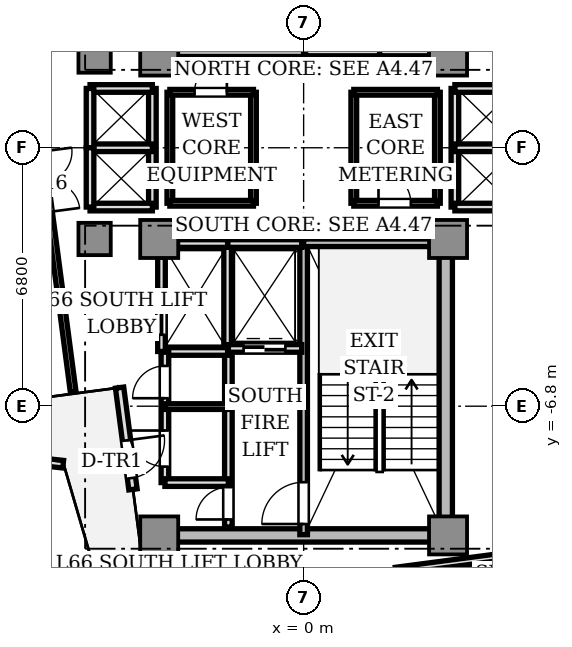
"""IFC4 building model, lengths in metres.
Left out: names, types, materials, properties, quantities, classifications, styles, units other than length and angle.
Written with IfcOpenShell. Run it as: python <this file> out.ifc"""

import sys

from ifc_helpers import new_model, si_unit, direction, frame, frame_2d, origin, origin_2d, place, context, subcontext, project, spatial, rectangle, extrude, source, transform, mapped, element, fill, save


model = new_model("IFC4")
c1 = context("Model", 3, precision=1e-05, world=origin(), true_north=direction((0.0, 1.0)))
c2 = subcontext(c1, "Body", "Model", "MODEL_VIEW")
j1 = project(units=[si_unit("LENGTHUNIT", "METRE"), si_unit("PLANEANGLEUNIT", "RADIAN")], contexts=[c1])
p1 = place(None, origin())
s1 = spatial("IfcSite", under=j1, at=p1, CompositionType="ELEMENT")
p2 = place(p1, origin())
s2 = spatial("IfcBuilding", under=s1, at=p2, CompositionType="ELEMENT")
p3 = place(p2, frame((0.0, 0.0, 237.8)))
s3 = spatial("IfcBuildingStorey", under=s2, at=p3, CompositionType="ELEMENT", Elevation=237.8)
p4 = place(p3, frame((-3.55, -10.2, 0.0), z_axis=(0.0, 0.0, 1.0), x_axis=(1.0, 0.0, 0.0)))
e1 = element("IfcWall", 1, at=p4, inside=s3, PredefinedType="SHEAR", context=c2, shape_type="SweptSolid", body=[
    extrude(rectangle(XDim=7.1, YDim=0.35, at=frame_2d((3.55, 0.0))), origin(), (0.0, 0.0, 1.0), 3.11),
])
p5 = place(p3, frame((3.74, -9.75, 0.0), z_axis=(0.0, 0.0, 1.0), x_axis=(0.0, 1.0, 0.0)))
e2 = element("IfcWall", 2, at=p5, inside=s3, PredefinedType="SHEAR", context=c2, shape_type="SweptSolid", body=[
    extrude(rectangle(XDim=6.9, YDim=0.35, at=frame_2d((3.45, 0.0))), origin(), (0.0, 0.0, 1.0), 3.11),
])
m1 = source(origin(), c2, "Body", "SweptSolid", [
    extrude(rectangle(XDim=1.0, YDim=1.0, at=origin_2d()), origin(), (0.0, 0.0, 1.0), 3.11),
])
for number, where, z_axis, x_axis in (
    (3, (-3.8, 2.4, 0.0), (0.0, 0.0, 1.0), (1.0, 0.0, 0.0)),
    (4, (3.8, 2.4, 0.0), (0.0, 0.0, 1.0), (1.0, 0.0, 0.0)),
    (5, (-3.8, -2.4, 0.0), (0.0, 0.0, 1.0), (1.0, 0.0, 0.0)),
    (6, (3.8, -2.4, 0.0), (0.0, 0.0, 1.0), (1.0, 0.0, 0.0)),
    (7, (-3.8, -10.2, 0.0), (0.0, 0.0, 1.0), (1.0, 0.0, 0.0)),
    (8, (3.8, -10.2, 0.0), (0.0, 0.0, 1.0), (1.0, 0.0, 0.0)),
):
    element("IfcColumn", number, at=place(p3, frame(where, z_axis=z_axis, x_axis=x_axis)), inside=s3, PredefinedType="COLUMN", context=c2, shape_type="MappedRepresentation", body=[
        mapped(m1, transform((0.0, 0.0, 0.0), scale=1.0)),
    ])
m2 = source(origin(), c2, "Body", "SweptSolid", [
    extrude(rectangle(XDim=0.85, YDim=0.85, at=origin_2d()), origin(), (0.0, 0.0, 1.0), 3.11),
])
for number, where, z_axis, x_axis in (
    (9, (-5.5, 2.4, 0.0), (0.0, 0.0, 1.0), (1.0, 0.0, 0.0)),
    (10, (-5.5, -2.4, 0.0), (0.0, 0.0, 1.0), (1.0, 0.0, 0.0)),
):
    element("IfcColumn", number, at=place(p3, frame(where, z_axis=z_axis, x_axis=x_axis)), inside=s3, PredefinedType="COLUMN", context=c2, shape_type="MappedRepresentation", body=[
        mapped(m2, transform((0.0, 0.0, 0.0), scale=1.0)),
    ])
p6 = place(p3, frame((-4.843, -6.311, 0.0), z_axis=(0.0, 0.0, 1.0), x_axis=(0.130564442062, -0.991439824936, 0.0)))
e11 = element("IfcWall", 11, at=p6, inside=s3, PredefinedType="STANDARD", context=c2, shape_type="SweptSolid", body=[
    extrude(rectangle(XDim=2.7, YDim=0.22, at=frame_2d((1.35, 0.0))), origin(), (0.0, 0.0, 1.0), 3.11),
])
p7 = place(p6, frame((1.4, 0.0, 0.0)))
e12 = element("IfcOpeningElement", 12, at=p7, cuts=e11, PredefinedType="OPENING", context=c2, shape_type="SweptSolid", body=[
    extrude(rectangle(XDim=1.0, YDim=2.2, at=frame_2d((0.5, 1.1))), frame((0.0, 0.12, 0.0), z_axis=(0.0, -1.0, 0.0), x_axis=(1.0, 0.0, 0.0)), (0.0, 0.0, 1.0), 0.24),
])
p8 = place(p3, frame((-8.0, -8.145, 0.0), z_axis=(0.0, 0.0, 1.0), x_axis=(0.994167153372, -0.107850225574, 0.0)))
e13 = element("IfcWall", 13, at=p8, inside=s3, PredefinedType="PARAPET", context=c2, shape_type="SweptSolid", body=[
    extrude(rectangle(XDim=1.682, YDim=0.2, at=frame_2d((0.841, 0.0))), origin(), (0.0, 0.0, 1.0), 0.65),
])
p9 = place(p3, frame((0.0, 2.5, 0.0), z_axis=(0.0, 0.0, 1.0), x_axis=(0.0, 1.0, 0.0)))
e14 = element("IfcWall", 14, at=p9, inside=s3, PredefinedType="SOLIDWALL", context=c2, shape_type="SweptSolid", body=[
    extrude(rectangle(XDim=7.68, YDim=0.2, at=frame_2d((3.84, 0.0))), origin(), (0.0, 0.0, 1.0), 3.11),
])
p10 = place(p9, frame((6.36, 0.0, 0.0)))
e15 = element("IfcOpeningElement", 15, at=p10, cuts=e14, PredefinedType="OPENING", context=c2, shape_type="SweptSolid", body=[
    extrude(rectangle(XDim=1.1, YDim=2.15, at=frame_2d((0.55, 1.075))), frame((0.0, 0.11, 0.0), z_axis=(0.0, -1.0, 0.0), x_axis=(1.0, 0.0, 0.0)), (0.0, 0.0, 1.0), 0.22),
])
p11 = place(p3, frame((-3.72, 2.5, 0.0), z_axis=(0.0, 0.0, 1.0), x_axis=(1.0, 0.0, 0.0)))
e16 = element("IfcWall", 16, at=p11, inside=s3, PredefinedType="SOLIDWALL", context=c2, shape_type="SweptSolid", body=[
    extrude(rectangle(XDim=3.72, YDim=0.2, at=frame_2d((1.86, 0.0))), origin(), (0.0, 0.0, 1.0), 3.11),
])
p12 = place(p3, frame((0.0, -10.18, 0.0), z_axis=(0.0, 0.0, 1.0), x_axis=(0.0, 1.0, 0.0)))
e17 = element("IfcWall", 17, at=p12, inside=s3, PredefinedType="SOLIDWALL", context=c2, shape_type="SweptSolid", body=[
    extrude(rectangle(XDim=7.68, YDim=0.2, at=frame_2d((3.84, 0.0))), origin(), (0.0, 0.0, 1.0), 3.11),
])
p13 = place(p12, frame((0.28, 0.0, 0.0)))
e18 = element("IfcOpeningElement", 18, at=p13, cuts=e17, PredefinedType="OPENING", context=c2, shape_type="SweptSolid", body=[
    extrude(rectangle(XDim=1.1, YDim=2.15, at=frame_2d((0.55, 1.075))), frame((0.0, 0.11, 0.0), z_axis=(0.0, -1.0, 0.0), x_axis=(1.0, 0.0, 0.0)), (0.0, 0.0, 1.0), 0.22),
])
p14 = place(p3, frame((0.0, -2.5, 0.0), z_axis=(0.0, 0.0, 1.0), x_axis=(1.0, 0.0, 0.0)))
e19 = element("IfcWall", 19, at=p14, inside=s3, PredefinedType="SOLIDWALL", context=c2, shape_type="SweptSolid", body=[
    extrude(rectangle(XDim=3.72, YDim=0.2, at=frame_2d((1.86, 0.0))), origin(), (0.0, 0.0, 1.0), 3.11),
])
p15 = place(p3, frame((-1.98, -9.98, 0.0), z_axis=(0.0, 0.0, 1.0), x_axis=(0.0, 1.0, 0.0)))
e20 = element("IfcWall", 20, at=p15, inside=s3, PredefinedType="SOLIDWALL", context=c2, shape_type="SweptSolid", body=[
    extrude(rectangle(XDim=4.66, YDim=0.2, at=frame_2d((2.33, 0.0))), origin(), (0.0, 0.0, 1.0), 2.66),
])
p16 = place(p15, frame((0.2, 0.0, 0.0)))
e21 = element("IfcOpeningElement", 21, at=p16, cuts=e20, PredefinedType="OPENING", context=c2, shape_type="SweptSolid", body=[
    extrude(rectangle(XDim=0.85, YDim=2.1, at=frame_2d((0.425, 1.05))), frame((0.0, 0.11, 0.0), z_axis=(0.0, -1.0, 0.0), x_axis=(1.0, 0.0, 0.0)), (0.0, 0.0, 1.0), 0.22),
])
p17 = place(p3, frame((2.0, 2.5, 0.0), z_axis=(0.0, 0.0, 1.0), x_axis=(0.0, 1.0, 0.0)))
e22 = element("IfcWall", 22, at=p17, inside=s3, PredefinedType="SOLIDWALL", context=c2, shape_type="SweptSolid", body=[
    extrude(rectangle(XDim=2.78, YDim=0.2, at=frame_2d((1.39, 0.0))), origin(), (0.0, 0.0, 1.0), 2.66),
])
p18 = place(p3, frame((0.05, 2.52, 0.0), z_axis=(0.0, 0.0, 1.0), x_axis=(1.0, 0.0, 0.0)))
e23 = element("IfcWall", 23, at=p18, inside=s3, PredefinedType="SOLIDWALL", context=c2, shape_type="SweptSolid", body=[
    extrude(rectangle(XDim=1.95, YDim=0.2, at=frame_2d((0.975, 0.0))), origin(), (0.0, 0.0, 1.0), 2.66),
])
p19 = place(p3, frame((-2.0, -5.28, 0.0), z_axis=(0.0, 0.0, 1.0), x_axis=(0.0, 1.0, 0.0)))
e24 = element("IfcWall", 24, at=p19, inside=s3, PredefinedType="SOLIDWALL", context=c2, shape_type="SweptSolid", body=[
    extrude(rectangle(XDim=2.78, YDim=0.2, at=frame_2d((1.39, 0.0))), origin(), (0.0, 0.0, 1.0), 2.66),
])
p20 = place(p3, frame((-2.0, -2.52, 0.0), z_axis=(0.0, 0.0, 1.0), x_axis=(1.0, 0.0, 0.0)))
e25 = element("IfcWall", 25, at=p20, inside=s3, PredefinedType="SOLIDWALL", context=c2, shape_type="SweptSolid", body=[
    extrude(rectangle(XDim=1.95, YDim=0.2, at=frame_2d((0.975, 0.0))), origin(), (0.0, 0.0, 1.0), 2.66),
])
p21 = place(p3, frame((-1.98, -5.28, 0.0), z_axis=(0.0, 0.0, 1.0), x_axis=(1.0, 0.0, 0.0)))
e26 = element("IfcWall", 26, at=p21, inside=s3, PredefinedType="SOLIDWALL", context=c2, shape_type="SweptSolid", body=[
    extrude(rectangle(XDim=1.93, YDim=0.2, at=frame_2d((0.965, 0.0))), origin(), (0.0, 0.0, 1.0), 2.66),
])
p22 = place(p21, frame((0.4, 0.0, 0.0)))
e27 = element("IfcOpeningElement", 27, at=p22, cuts=e26, PredefinedType="OPENING", context=c2, shape_type="SweptSolid", body=[
    extrude(rectangle(XDim=1.1, YDim=2.2, at=frame_2d((0.55, 1.1))), frame((0.0, 0.11, 0.0), z_axis=(0.0, -1.0, 0.0), x_axis=(1.0, 0.0, 0.0)), (0.0, 0.0, 1.0), 0.22),
])
for number, where, z_axis, x_axis in (
    (28, (2.0, 2.52, 0.0), (0.0, 0.0, 1.0), (1.0, 0.0, 0.0)),
    (29, (-3.32, -2.52, 0.0), (0.0, 0.0, 1.0), (1.0, 0.0, 0.0)),
):
    element("IfcWall", number, at=place(p3, frame(where, z_axis=z_axis, x_axis=x_axis)), inside=s3, PredefinedType="SOLIDWALL", context=c2, shape_type="SweptSolid", body=[
        extrude(rectangle(XDim=1.32, YDim=0.2, at=frame_2d((0.66, 0.0))), origin(), (0.0, 0.0, 1.0), 2.66),
    ])
p23 = place(p3, frame((-3.74, -5.36, 0.0), z_axis=(0.0, 0.0, 1.0), x_axis=(1.0, 0.0, 0.0)))
e30 = element("IfcWall", 30, at=p23, inside=s3, PredefinedType="SOLIDWALL", context=c2, shape_type="SweptSolid", body=[
    extrude(rectangle(XDim=1.74, YDim=0.2, at=frame_2d((0.87, 0.0))), origin(), (0.0, 0.0, 1.0), 2.66),
])
p24 = place(p3, frame((-3.74, -5.36, 0.0), z_axis=(0.0, 0.0, 1.0), x_axis=(0.0, 1.0, 0.0)))
e31 = element("IfcWall", 31, at=p24, inside=s3, PredefinedType="SOLIDWALL", context=c2, shape_type="SweptSolid", body=[
    extrude(rectangle(XDim=2.48, YDim=0.2, at=frame_2d((1.24, 0.0))), origin(), (0.0, 0.0, 1.0), 2.66),
])
p25 = place(p24, frame((0.44, 0.0, 0.0)))
e32 = element("IfcOpeningElement", 32, at=p25, cuts=e31, PredefinedType="OPENING", context=c2, shape_type="SweptSolid", body=[
    extrude(rectangle(XDim=1.2, YDim=2.2, at=frame_2d((0.6, 1.1))), frame((0.0, 0.11, 0.0), z_axis=(0.0, -1.0, 0.0), x_axis=(1.0, 0.0, 0.0)), (0.0, 0.0, 1.0), 0.22),
])
p26 = place(p3, frame((3.98, -1.56, 0.0), z_axis=(0.0, 0.0, 1.0), x_axis=(0.0, 1.0, 0.0)))
e33 = element("IfcWall", 33, at=p26, inside=s3, PredefinedType="SOLIDWALL", context=c2, shape_type="SweptSolid", body=[
    extrude(rectangle(XDim=3.12, YDim=0.2, at=frame_2d((1.56, 0.0))), origin(), (0.0, 0.0, 1.0), 2.33),
])
for number, where, z_axis, x_axis in (
    (34, (3.98, 1.56, 0.0), (0.0, 0.0, 1.0), (1.0, 0.0, 0.0)),
    (35, (3.98, -1.56, 0.0), (0.0, 0.0, 1.0), (1.0, 0.0, 0.0)),
    (36, (3.98, 0.0, 0.0), (0.0, 0.0, 1.0), (1.0, 0.0, 0.0)),
):
    element("IfcWall", number, at=place(p3, frame(where, z_axis=z_axis, x_axis=x_axis)), inside=s3, PredefinedType="SOLIDWALL", context=c2, shape_type="SweptSolid", body=[
        extrude(rectangle(XDim=1.64, YDim=0.2, at=frame_2d((0.82, 0.0))), origin(), (0.0, 0.0, 1.0), 2.66),
    ])
p27 = place(p3, frame((-3.98, -1.56, 0.0), z_axis=(0.0, 0.0, 1.0), x_axis=(0.0, 1.0, 0.0)))
e37 = element("IfcWall", 37, at=p27, inside=s3, PredefinedType="SOLIDWALL", context=c2, shape_type="SweptSolid", body=[
    extrude(rectangle(XDim=3.12, YDim=0.2, at=frame_2d((1.56, 0.0))), origin(), (0.0, 0.0, 1.0), 2.33),
])
for number, where, z_axis, x_axis in (
    (38, (-5.62, 1.56, 0.0), (0.0, 0.0, 1.0), (1.0, 0.0, 0.0)),
    (39, (-5.62, -1.56, 0.0), (0.0, 0.0, 1.0), (1.0, 0.0, 0.0)),
    (40, (-5.62, 0.0, 0.0), (0.0, 0.0, 1.0), (1.0, 0.0, 0.0)),
):
    element("IfcWall", number, at=place(p3, frame(where, z_axis=z_axis, x_axis=x_axis)), inside=s3, PredefinedType="SOLIDWALL", context=c2, shape_type="SweptSolid", body=[
        extrude(rectangle(XDim=1.64, YDim=0.2, at=frame_2d((0.82, 0.0))), origin(), (0.0, 0.0, 1.0), 2.66),
    ])
for number, where, z_axis, x_axis in (
    (41, (-5.62, 0.0, 0.0), (0.0, 0.0, 1.0), (0.0, 1.0, 0.0)),
    (42, (-5.62, -1.56, 0.0), (0.0, 0.0, 1.0), (0.0, 1.0, 0.0)),
):
    element("IfcWall", number, at=place(p3, frame(where, z_axis=z_axis, x_axis=x_axis)), inside=s3, PredefinedType="SOLIDWALL", context=c2, shape_type="SweptSolid", body=[
        extrude(rectangle(XDim=1.56, YDim=0.2, at=frame_2d((0.78, 0.0))), origin(), (0.0, 0.0, 1.0), 2.66),
    ])
p28 = place(p3, frame((-3.65, -8.81, 0.0), z_axis=(0.0, 0.0, 1.0), x_axis=(0.0, 1.0, 0.0)))
e43 = element("IfcWall", 43, at=p28, inside=s3, PredefinedType="SOLIDWALL", context=c2, shape_type="SweptSolid", body=[
    extrude(rectangle(XDim=3.43, YDim=0.2, at=frame_2d((1.715, 0.0))), origin(), (0.0, 0.0, 1.0), 2.66),
])
p29 = place(p28, frame((0.42, 0.0, 0.0)))
e44 = element("IfcOpeningElement", 44, at=p29, cuts=e43, PredefinedType="OPENING", context=c2, shape_type="SweptSolid", body=[
    extrude(rectangle(XDim=0.95, YDim=2.15, at=frame_2d((0.475, 1.075))), frame((0.0, 0.11, 0.0), z_axis=(0.0, -1.0, 0.0), x_axis=(1.0, 0.0, 0.0)), (0.0, 0.0, 1.0), 0.22),
])
p30 = place(p28, frame((2.22, 0.0, 0.0)))
e45 = element("IfcOpeningElement", 45, at=p30, cuts=e43, PredefinedType="OPENING", context=c2, shape_type="SweptSolid", body=[
    extrude(rectangle(XDim=0.85, YDim=2.1, at=frame_2d((0.425, 1.05))), frame((0.0, 0.11, 0.0), z_axis=(0.0, -1.0, 0.0), x_axis=(1.0, 0.0, 0.0)), (0.0, 0.0, 1.0), 0.22),
])
p31 = place(p3, frame((-3.65, -8.81, 0.0), z_axis=(0.0, 0.0, 1.0), x_axis=(1.0, 0.0, 0.0)))
e46 = element("IfcWall", 46, at=p31, inside=s3, PredefinedType="SOLIDWALL", context=c2, shape_type="SweptSolid", body=[
    extrude(rectangle(XDim=1.67, YDim=0.2, at=frame_2d((0.835, 0.0))), origin(), (0.0, 0.0, 1.0), 2.66),
])
p32 = place(p3, frame((-3.65, -6.81, 0.0), z_axis=(0.0, 0.0, 1.0), x_axis=(1.0, 0.0, 0.0)))
e47 = element("IfcWall", 47, at=p32, inside=s3, PredefinedType="PARTITIONING", context=c2, shape_type="SweptSolid", body=[
    extrude(rectangle(XDim=1.67, YDim=0.15, at=frame_2d((0.835, 0.0))), origin(), (0.0, 0.0, 1.0), 2.66),
])
p33 = place(p3, frame((-1.32, -1.46, 0.0), z_axis=(0.0, 0.0, 1.0), x_axis=(0.0, 1.0, 0.0)))
e48 = element("IfcWall", 48, at=p33, inside=s3, PredefinedType="PARTITIONING", context=c2, shape_type="SweptSolid", body=[
    extrude(rectangle(XDim=2.92, YDim=0.15, at=frame_2d((1.46, 0.0))), origin(), (0.0, 0.0, 1.0), 2.66),
])
p34 = place(p3, frame((-3.52, -1.46, 0.0), z_axis=(0.0, 0.0, 1.0), x_axis=(0.0, 1.0, 0.0)))
e49 = element("IfcWall", 49, at=p34, inside=s3, PredefinedType="PARTITIONING", context=c2, shape_type="SweptSolid", body=[
    extrude(rectangle(XDim=2.92, YDim=0.15, at=frame_2d((1.46, 0.0))), origin(), (0.0, 0.0, 1.0), 2.33),
])
p35 = place(p3, frame((-3.52, 1.46, 0.0), z_axis=(0.0, 0.0, 1.0), x_axis=(1.0, 0.0, 0.0)))
e50 = element("IfcWall", 50, at=p35, inside=s3, PredefinedType="PARTITIONING", context=c2, shape_type="SweptSolid", body=[
    extrude(rectangle(XDim=2.2, YDim=0.15, at=frame_2d((1.1, 0.0))), origin(), (0.0, 0.0, 1.0), 2.66),
])
p36 = place(p35, frame((0.65, 0.0, 0.0)))
e51 = element("IfcOpeningElement", 51, at=p36, cuts=e50, PredefinedType="OPENING", context=c2, shape_type="SweptSolid", body=[
    extrude(rectangle(XDim=0.85, YDim=2.1, at=frame_2d((0.425, 1.05))), frame((0.0, 0.085, 0.0), z_axis=(0.0, -1.0, 0.0), x_axis=(1.0, 0.0, 0.0)), (0.0, 0.0, 1.0), 0.17),
])
p37 = place(p3, frame((-3.52, -1.46, 0.0), z_axis=(0.0, 0.0, 1.0), x_axis=(1.0, 0.0, 0.0)))
e52 = element("IfcWall", 52, at=p37, inside=s3, PredefinedType="PARTITIONING", context=c2, shape_type="SweptSolid", body=[
    extrude(rectangle(XDim=2.2, YDim=0.15, at=frame_2d((1.1, 0.0))), origin(), (0.0, 0.0, 1.0), 2.66),
])
p38 = place(p3, frame((1.32, -1.46, 0.0), z_axis=(0.0, 0.0, 1.0), x_axis=(0.0, 1.0, 0.0)))
e53 = element("IfcWall", 53, at=p38, inside=s3, PredefinedType="PARTITIONING", context=c2, shape_type="SweptSolid", body=[
    extrude(rectangle(XDim=2.92, YDim=0.15, at=frame_2d((1.46, 0.0))), origin(), (0.0, 0.0, 1.0), 2.66),
])
p39 = place(p3, frame((3.52, -1.46, 0.0), z_axis=(0.0, 0.0, 1.0), x_axis=(0.0, 1.0, 0.0)))
e54 = element("IfcWall", 54, at=p39, inside=s3, PredefinedType="PARTITIONING", context=c2, shape_type="SweptSolid", body=[
    extrude(rectangle(XDim=2.92, YDim=0.15, at=frame_2d((1.46, 0.0))), origin(), (0.0, 0.0, 1.0), 2.33),
])
p40 = place(p3, frame((1.32, 1.46, 0.0), z_axis=(0.0, 0.0, 1.0), x_axis=(1.0, 0.0, 0.0)))
e55 = element("IfcWall", 55, at=p40, inside=s3, PredefinedType="PARTITIONING", context=c2, shape_type="SweptSolid", body=[
    extrude(rectangle(XDim=2.2, YDim=0.15, at=frame_2d((1.1, 0.0))), origin(), (0.0, 0.0, 1.0), 2.66),
])
p41 = place(p3, frame((1.32, -1.46, 0.0), z_axis=(0.0, 0.0, 1.0), x_axis=(1.0, 0.0, 0.0)))
e56 = element("IfcWall", 56, at=p41, inside=s3, PredefinedType="PARTITIONING", context=c2, shape_type="SweptSolid", body=[
    extrude(rectangle(XDim=2.2, YDim=0.15, at=frame_2d((1.1, 0.0))), origin(), (0.0, 0.0, 1.0), 2.66),
])
p42 = place(p41, frame((0.65, 0.0, 0.0)))
e57 = element("IfcOpeningElement", 57, at=p42, cuts=e56, PredefinedType="OPENING", context=c2, shape_type="SweptSolid", body=[
    extrude(rectangle(XDim=0.85, YDim=2.1, at=frame_2d((0.425, 1.05))), frame((0.0, 0.085, 0.0), z_axis=(0.0, -1.0, 0.0), x_axis=(1.0, 0.0, 0.0)), (0.0, 0.0, 1.0), 0.17),
])
p43 = place(p3, frame((-7.519, 4.633, 0.0), z_axis=(0.0, 0.0, 1.0), x_axis=(0.130521347626, -0.991445499165, 0.0)))
e58 = element("IfcWall", 58, at=p43, inside=s3, PredefinedType="PARTITIONING", context=c2, shape_type="SweptSolid", body=[
    extrude(rectangle(XDim=11.15, YDim=0.15, at=frame_2d((5.575, 0.0))), origin(), (0.0, 0.0, 1.0), 2.66),
])
p44 = place(p43, frame((4.775, 0.0, 0.0)))
e59 = element("IfcOpeningElement", 59, at=p44, cuts=e58, PredefinedType="OPENING", context=c2, shape_type="SweptSolid", body=[
    extrude(rectangle(XDim=1.6, YDim=2.25, at=frame_2d((0.8, 1.125))), frame((0.0, 0.085, 0.0), z_axis=(0.0, -1.0, 0.0), x_axis=(1.0, 0.0, 0.0)), (0.0, 0.0, 1.0), 0.17),
])
p45 = place(p3, frame((2.423, -11.129, 0.0), z_axis=(0.0, 0.0, 1.0), x_axis=(0.991442792852, 0.130541903244, 0.0)))
e60 = element("IfcWall", 60, at=p45, inside=s3, PredefinedType="PARTITIONING", context=c2, shape_type="SweptSolid", body=[
    extrude(rectangle(XDim=4.625, YDim=0.18, at=frame_2d((2.312, 0.0))), origin(), (0.0, 0.0, 1.0), 2.66),
])
m3 = source(origin(), c2, "Body", "SweptSolid", [
    extrude(rectangle(XDim=1.0, YDim=0.05, at=origin_2d()), origin(), (0.0, 0.0, 1.0), 2.2),
])
p46 = place(p7, frame((0.5, 0.0, 0.0)))
e61 = element("IfcDoor", 61, at=p46, inside=s3, OperationType="SINGLE_SWING_LEFT", PredefinedType="DOOR", context=c2, shape_type="MappedRepresentation", body=[
    mapped(m3, transform((0.0, 0.0, 0.0), scale=1.0)),
])
fill(e12, e61)
m4 = source(origin(), c2, "Body", "SweptSolid", [
    extrude(rectangle(XDim=1.1, YDim=0.05, at=origin_2d()), origin(), (0.0, 0.0, 1.0), 2.15),
])
p47 = place(p13, frame((0.55, 0.0, 0.0)))
e62 = element("IfcDoor", 62, at=p47, inside=s3, OperationType="SINGLE_SWING_LEFT", PredefinedType="DOOR", context=c2, shape_type="MappedRepresentation", body=[
    mapped(m4, transform((0.0, 0.0, 0.0), scale=1.0)),
])
fill(e18, e62)
m5 = source(origin(), c2, "Body", "SweptSolid", [
    extrude(rectangle(XDim=0.85, YDim=0.05, at=origin_2d()), origin(), (0.0, 0.0, 1.0), 2.1),
])
p48 = place(p16, frame((0.425, 0.0, 0.0)))
e63 = element("IfcDoor", 63, at=p48, inside=s3, OperationType="SINGLE_SWING_LEFT", PredefinedType="DOOR", context=c2, shape_type="MappedRepresentation", body=[
    mapped(m5, transform((0.0, 0.0, 0.0), scale=1.0)),
])
fill(e21, e63)
m6 = source(origin(), c2, "Body", "SweptSolid", [
    extrude(rectangle(XDim=1.1, YDim=0.05, at=origin_2d()), origin(), (0.0, 0.0, 1.0), 2.2),
])
p49 = place(p22, frame((0.55, 0.0, 0.0)))
e64 = element("IfcDoor", 64, at=p49, inside=s3, OperationType="DOUBLE_DOOR_SLIDING", PredefinedType="DOOR", context=c2, shape_type="MappedRepresentation", body=[
    mapped(m6, transform((0.0, 0.0, 0.0), scale=1.0)),
])
fill(e27, e64)
m7 = source(origin(), c2, "Body", "SweptSolid", [
    extrude(rectangle(XDim=1.2, YDim=0.05, at=origin_2d()), origin(), (0.0, 0.0, 1.0), 2.2),
])
p50 = place(p25, frame((0.6, 0.0, 0.0)))
e65 = element("IfcDoor", 65, at=p50, inside=s3, OperationType="DOUBLE_DOOR_SLIDING", PredefinedType="DOOR", context=c2, shape_type="MappedRepresentation", body=[
    mapped(m7, transform((0.0, 0.0, 0.0), scale=1.0)),
])
fill(e32, e65)
m8 = source(origin(), c2, "Body", "SweptSolid", [
    extrude(rectangle(XDim=0.95, YDim=0.05, at=origin_2d()), origin(), (0.0, 0.0, 1.0), 2.15),
])
p51 = place(p29, frame((0.475, 0.0, 0.0)))
e66 = element("IfcDoor", 66, at=p51, inside=s3, OperationType="SINGLE_SWING_RIGHT", PredefinedType="DOOR", context=c2, shape_type="MappedRepresentation", body=[
    mapped(m8, transform((0.0, 0.0, 0.0), scale=1.0)),
])
fill(e44, e66)
p52 = place(p30, frame((0.425, 0.0, 0.0)))
e67 = element("IfcDoor", 67, at=p52, inside=s3, OperationType="SINGLE_SWING_LEFT", PredefinedType="DOOR", context=c2, shape_type="MappedRepresentation", body=[
    mapped(m5, transform((0.0, 0.0, 0.0), scale=1.0)),
])
fill(e45, e67)
p53 = place(p36, frame((0.425, 0.0, 0.0)))
e68 = element("IfcDoor", 68, at=p53, inside=s3, OperationType="SINGLE_SWING_RIGHT", PredefinedType="DOOR", context=c2, shape_type="MappedRepresentation", body=[
    mapped(m5, transform((0.0, 0.0, 0.0), scale=1.0)),
])
fill(e51, e68)
p54 = place(p42, frame((0.425, 0.0, 0.0)))
e69 = element("IfcDoor", 69, at=p54, inside=s3, OperationType="SINGLE_SWING_LEFT", PredefinedType="DOOR", context=c2, shape_type="MappedRepresentation", body=[
    mapped(m5, transform((0.0, 0.0, 0.0), scale=1.0)),
])
fill(e57, e69)
save(model, sys.argv[1])
